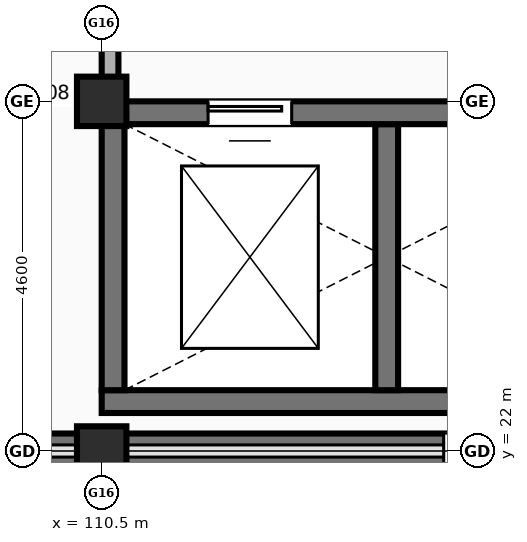
"""IFC4 building model, lengths in metres.
Left out: names, types, materials, properties, quantities, classifications, styles, units other than length and angle.
Written with IfcOpenShell. Run it as: python <this file> out.ifc"""

import sys

from ifc_helpers import new_model, si_unit, direction, frame, frame_2d, origin, origin_2d, place, context, subcontext, project, spatial, polyline, rectangle, outline, extrude, element, fill, save


model = new_model("IFC4")
c1 = context("Model", 3, precision=1e-05, world=origin(), true_north=direction((0.0, 1.0)))
c2 = subcontext(c1, "Body", "Model", "MODEL_VIEW")
j1 = project(units=[si_unit("LENGTHUNIT", "METRE"), si_unit("PLANEANGLEUNIT", "RADIAN")], contexts=[c1])
p1 = place(None, origin())
s1 = spatial("IfcSite", under=j1, at=p1, CompositionType="ELEMENT")
p2 = place(p1, origin())
s2 = spatial("IfcBuilding", under=s1, at=p2, CompositionType="ELEMENT")
p3 = place(p2, frame((0.0, 0.0, 14.2)))
s3 = spatial("IfcBuildingStorey", under=s2, at=p3, CompositionType="ELEMENT", Elevation=14.2)
for number, where, z_axis, x_axis in (
    (1, (110.5, 22.0, 0.0), (0.0, 0.0, 1.0), (1.0, 0.0, 0.0)),
    (2, (110.5, 26.6, 0.0), (0.0, 0.0, 1.0), (1.0, 0.0, 0.0)),
):
    element("IfcColumn", number, at=place(p3, frame(where, z_axis=z_axis, x_axis=x_axis)), inside=s3, PredefinedType="COLUMN", context=c2, shape_type="SweptSolid", body=[
        extrude(rectangle(XDim=0.65, YDim=0.65, at=origin_2d()), origin(), (0.0, 0.0, 1.0), 3.8),
    ])
p4 = place(p3, frame((110.5, 22.65, 0.0), z_axis=(0.0, 0.0, 1.0), x_axis=(1.0, 0.0, 0.0)))
e3 = element("IfcWall", 3, at=p4, inside=s3, PredefinedType="SHEAR", context=c2, shape_type="SweptSolid", body=[
    extrude(rectangle(XDim=7.5, YDim=0.3, at=frame_2d((3.75, 0.0))), origin(), (0.0, 0.0, 1.0), 3.8),
])
for number, where, z_axis, x_axis in (
    (4, (110.65, 22.8, 0.0), (0.0, 0.0, 1.0), (0.0, 1.0, 0.0)),
    (5, (114.25, 22.8, 0.0), (0.0, 0.0, 1.0), (0.0, 1.0, 0.0)),
):
    element("IfcWall", number, at=place(p3, frame(where, z_axis=z_axis, x_axis=x_axis)), inside=s3, PredefinedType="SHEAR", context=c2, shape_type="SweptSolid", body=[
        extrude(rectangle(XDim=3.5, YDim=0.3, at=frame_2d((1.75, 0.0))), origin(), (0.0, 0.0, 1.0), 3.8),
    ])
p5 = place(p3, frame((103.14, 22.0, 3.8), z_axis=(0.0, 0.0, 1.0), x_axis=(1.0, 0.0, 0.0)))
e6 = element("IfcWall", 6, at=p5, inside=s3, PredefinedType="SOLIDWALL", context=c2, shape_type="SweptSolid", body=[
    extrude(outline(polyline([(0.0, 0.0), (29.72, 0.0), (29.72, 2.177), (28.877, 3.859), (28.092, 5.46), (27.125, 6.958), (25.99, 8.333), (24.701, 9.565), (23.277, 10.637), (21.737, 11.536), (20.102, 12.248), (18.395, 12.763), (16.64, 13.076), (14.86, 13.18), (13.08, 13.076), (11.325, 12.763), (9.618, 12.248), (7.983, 11.536), (6.443, 10.637), (5.019, 9.565), (3.73, 8.333), (2.595, 6.958), (1.628, 5.46), (0.843, 3.859), (0.0, 2.177), (0.0, 0.0)])), frame((0.0, 0.23, 0.0), z_axis=(0.0, -1.0, 0.0), x_axis=(1.0, 0.0, 0.0)), (0.0, 0.0, 1.0), 0.46),
])
p6 = place(p5, frame((11.86, 0.0, 3.6)))
e7 = element("IfcOpeningElement", 7, at=p6, cuts=e6, PredefinedType="OPENING", context=c2, shape_type="SweptSolid", body=[
    extrude(outline(polyline([(6.0, 3.0), (5.898, 3.776), (5.598, 4.5), (5.121, 5.121), (4.5, 5.598), (3.776, 5.898), (3.0, 6.0), (2.224, 5.898), (1.5, 5.598), (0.879, 5.121), (0.402, 4.5), (0.102, 3.776), (0.0, 3.0), (0.102, 2.224), (0.402, 1.5), (0.879, 0.879), (1.5, 0.402), (2.224, 0.102), (3.0, 0.0), (3.776, 0.102), (4.5, 0.402), (5.121, 0.879), (5.598, 1.5), (5.898, 2.224), (6.0, 3.0)])), frame((0.0, 0.24, 0.0), z_axis=(0.0, -1.0, 0.0), x_axis=(1.0, 0.0, 0.0)), (0.0, 0.0, 1.0), 0.48),
])
p7 = place(p3, frame((110.5, 26.45, 0.0), z_axis=(0.0, 0.0, 1.0), x_axis=(1.0, 0.0, 0.0)))
e8 = element("IfcWall", 8, at=p7, inside=s3, PredefinedType="SHEAR", context=c2, shape_type="SweptSolid", body=[
    extrude(rectangle(XDim=7.5, YDim=0.3, at=frame_2d((3.75, 0.0))), origin(), (0.0, 0.0, 1.0), 3.8),
])
p8 = place(p7, frame((1.4, 0.0, 0.0)))
e9 = element("IfcOpeningElement", 9, at=p8, cuts=e8, PredefinedType="OPENING", context=c2, shape_type="SweptSolid", body=[
    extrude(rectangle(XDim=1.1, YDim=2.15, at=frame_2d((0.55, 1.075))), frame((0.0, 0.16, 0.0), z_axis=(0.0, -1.0, 0.0), x_axis=(1.0, 0.0, 0.0)), (0.0, 0.0, 1.0), 0.32),
])
p9 = place(p3, frame((110.61, 26.75, 0.0), z_axis=(0.0, 0.0, 1.0), x_axis=(0.0, 1.0, 0.0)))
e10 = element("IfcWall", 10, at=p9, inside=s3, PredefinedType="SOLIDWALL", context=c2, shape_type="SweptSolid", body=[
    extrude(rectangle(XDim=3.83, YDim=0.22, at=frame_2d((1.915, 0.0))), origin(), (0.0, 0.0, 1.0), 2.7),
])
p10 = place(p6, origin())
e11 = element("IfcWindow", 11, at=p10, inside=s3, PartitioningType="SINGLE_PANEL", PredefinedType="WINDOW", context=c2, shape_type="SweptSolid", body=[
    extrude(outline(polyline([(6.0, 3.0), (5.898, 3.776), (5.598, 4.5), (5.121, 5.121), (4.5, 5.598), (3.776, 5.898), (3.0, 6.0), (2.224, 5.898), (1.5, 5.598), (0.879, 5.121), (0.402, 4.5), (0.102, 3.776), (0.0, 3.0), (0.102, 2.224), (0.402, 1.5), (0.879, 0.879), (1.5, 0.402), (2.224, 0.102), (3.0, 0.0), (3.776, 0.102), (4.5, 0.402), (5.121, 0.879), (5.598, 1.5), (5.898, 2.224), (6.0, 3.0)])), frame((0.0, 0.03, 0.0), z_axis=(0.0, -1.0, 0.0), x_axis=(1.0, 0.0, 0.0)), (0.0, 0.0, 1.0), 0.06),
])
fill(e7, e11)
p11 = place(p8, origin())
e12 = element("IfcDoor", 12, at=p11, inside=s3, OperationType="SLIDING_TO_LEFT", PredefinedType="DOOR", context=c2, shape_type="SweptSolid", body=[
    extrude(rectangle(XDim=1.1, YDim=2.15, at=frame_2d((0.55, 1.075))), frame((0.0, 0.025, 0.0), z_axis=(0.0, -1.0, 0.0), x_axis=(1.0, 0.0, 0.0)), (0.0, 0.0, 1.0), 0.05),
])
fill(e9, e12)
save(model, sys.argv[1])
